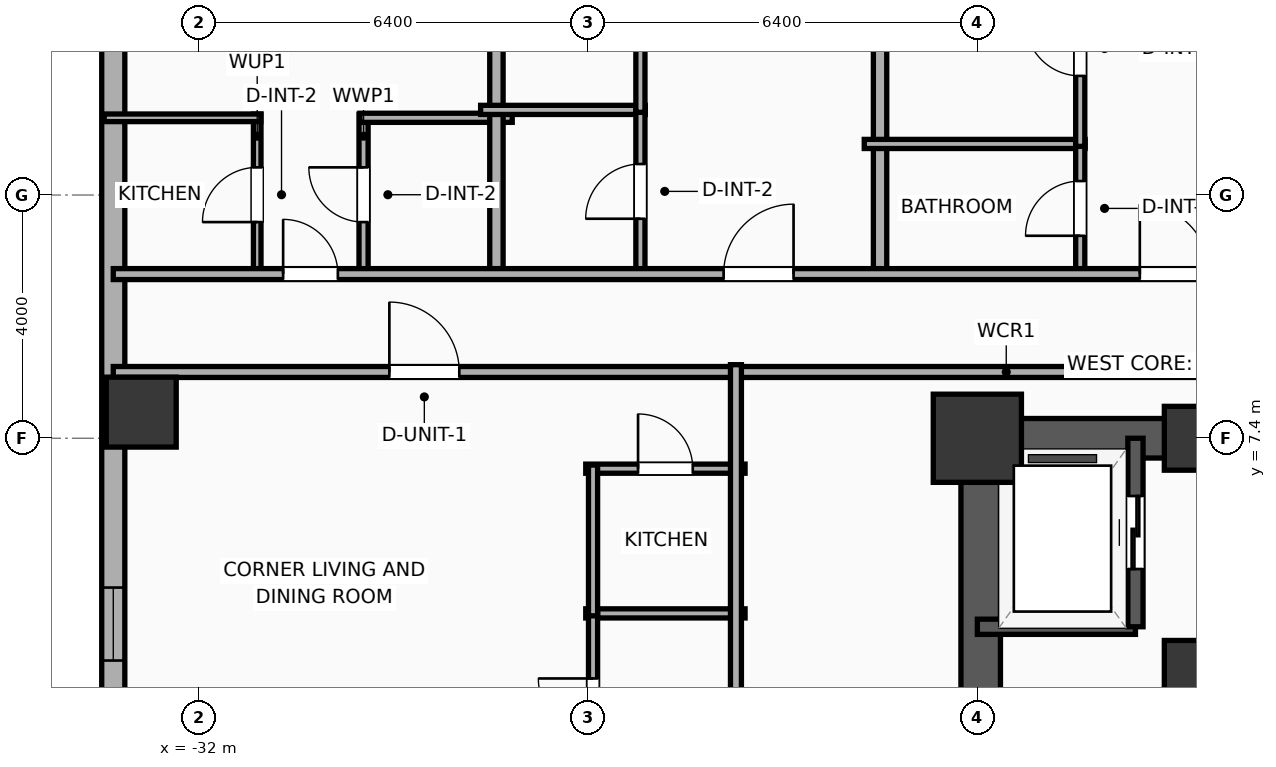
"""IFC4 building model, lengths in metres.
Left out: names, types, materials, properties, quantities, classifications, styles, units other than length and angle.
Written with IfcOpenShell. Run it as: python <this file> out.ifc"""

import sys

from ifc_helpers import new_model, si_unit, direction, frame, frame_2d, origin, origin_2d, place, context, subcontext, project, spatial, rectangle, hollow_rectangle, extrude, element, fill, save


model = new_model("IFC4")
c1 = context("Model", 3, precision=1e-05, world=origin(), true_north=direction((0.0, 1.0)))
c2 = subcontext(c1, "Body", "Model", "MODEL_VIEW")
j1 = project(units=[si_unit("LENGTHUNIT", "METRE"), si_unit("PLANEANGLEUNIT", "RADIAN")], contexts=[c1])
p1 = place(None, origin())
s1 = spatial("IfcSite", under=j1, at=p1, CompositionType="ELEMENT")
p2 = place(p1, origin())
s2 = spatial("IfcBuilding", under=s1, at=p2, CompositionType="ELEMENT")
p3 = place(p2, frame((0.0, 0.0, 33.8)))
s3 = spatial("IfcBuildingStorey", under=s2, at=p3, CompositionType="ELEMENT", Elevation=33.8)
p4 = place(p3, frame((-19.2, 7.4, 0.0), z_axis=(0.0, 0.0, 1.0), x_axis=(1.0, 0.0, 0.0)))
e1 = element("IfcColumn", 1, at=p4, inside=s3, PredefinedType="COLUMN", context=c2, shape_type="SweptSolid", body=[
    extrude(rectangle(XDim=1.45, YDim=1.45, at=origin_2d()), origin(), (0.0, 0.0, 1.0), 3.9),
])
for number, where, z_axis, x_axis in (
    (2, (-15.6, 7.4, 0.0), (0.0, 0.0, 1.0), (1.0, 0.0, 0.0)),
    (3, (-15.6, 3.55, 0.0), (0.0, 0.0, 1.0), (1.0, 0.0, 0.0)),
):
    element("IfcColumn", number, at=place(p3, frame(where, z_axis=z_axis, x_axis=x_axis)), inside=s3, PredefinedType="COLUMN", context=c2, shape_type="SweptSolid", body=[
        extrude(rectangle(XDim=1.05, YDim=1.05, at=origin_2d()), origin(), (0.0, 0.0, 1.0), 3.9),
    ])
p5 = place(p3, frame((-19.525, 7.4, 0.0), z_axis=(0.0, 0.0, 1.0), x_axis=(1.0, 0.0, 0.0)))
e4 = element("IfcWall", 4, at=p5, inside=s3, PredefinedType="SHEAR", context=c2, shape_type="SweptSolid", body=[
    extrude(rectangle(XDim=7.45, YDim=0.65, at=frame_2d((3.725, 0.0))), origin(), (0.0, 0.0, 1.0), 3.65),
])
p6 = place(p3, frame((-19.145, -7.4, 0.0), z_axis=(0.0, 0.0, 1.0), x_axis=(0.0, 1.0, 0.0)))
e5 = element("IfcWall", 5, at=p6, inside=s3, PredefinedType="SHEAR", context=c2, shape_type="SweptSolid", body=[
    extrude(rectangle(XDim=14.8, YDim=0.65, at=frame_2d((7.4, 0.0))), origin(), (0.0, 0.0, 1.0), 3.65),
])
p7 = place(p3, frame((-32.95, 7.83, 0.0), z_axis=(0.0, 0.0, 1.0), x_axis=(1.0, 0.0, 0.0)))
e6 = element("IfcColumn", 6, at=p7, inside=s3, PredefinedType="COLUMN", context=c2, shape_type="SweptSolid", body=[
    extrude(hollow_rectangle(XDim=1.15, YDim=1.15, WallThickness=0.04, at=origin_2d()), origin(), (0.0, 0.0, 1.0), 3.9),
])
p8 = place(p3, frame((-33.41, -18.381, 0.0), z_axis=(0.0, 0.0, 1.0), x_axis=(0.0, 1.0, 0.0)))
e7 = element("IfcWall", 7, at=p8, inside=s3, PredefinedType="ELEMENTEDWALL", context=c2, shape_type="SweptSolid", body=[
    extrude(rectangle(XDim=36.763, YDim=0.38, at=frame_2d((18.381, 0.0))), origin(), (0.0, 0.0, 1.0), 3.65),
])
p9 = place(p8, frame((32.857, 0.0, 0.75)))
e8 = element("IfcOpeningElement", 8, at=p9, cuts=e7, PredefinedType="OPENING", context=c2, shape_type="SweptSolid", body=[
    extrude(rectangle(XDim=1.2, YDim=2.05, at=frame_2d((0.6, 1.025))), frame((0.0, 0.2, 0.0), z_axis=(0.0, -1.0, 0.0), x_axis=(1.0, 0.0, 0.0)), (0.0, 0.0, 1.0), 0.4),
])
p10 = place(p8, frame((22.126, 0.0, 0.75)))
e9 = element("IfcOpeningElement", 9, at=p10, cuts=e7, PredefinedType="OPENING", context=c2, shape_type="SweptSolid", body=[
    extrude(rectangle(XDim=1.2, YDim=2.05, at=frame_2d((0.6, 1.025))), frame((0.0, 0.2, 0.0), z_axis=(0.0, -1.0, 0.0), x_axis=(1.0, 0.0, 0.0)), (0.0, 0.0, 1.0), 0.4),
])
p11 = place(p8, frame((13.576, 0.0, 0.75)))
e10 = element("IfcOpeningElement", 10, at=p11, cuts=e7, PredefinedType="OPENING", context=c2, shape_type="SweptSolid", body=[
    extrude(rectangle(XDim=1.2, YDim=2.05, at=frame_2d((0.6, 1.025))), frame((0.0, 0.2, 0.0), z_axis=(0.0, -1.0, 0.0), x_axis=(1.0, 0.0, 0.0)), (0.0, 0.0, 1.0), 0.4),
])
p12 = place(p3, frame((-19.2, 4.3, 0.0), z_axis=(0.0, 0.0, 1.0), x_axis=(1.0, 0.0, 0.0)))
e11 = element("IfcWall", 11, at=p12, inside=s3, PredefinedType="SOLIDWALL", context=c2, shape_type="SweptSolid", body=[
    extrude(rectangle(XDim=2.6, YDim=0.25, at=frame_2d((1.3, 0.0))), origin(), (0.0, 0.0, 1.0), 3.65),
])
p13 = place(p3, frame((-16.6, 4.3, 0.0), z_axis=(0.0, 0.0, 1.0), x_axis=(0.0, 1.0, 0.0)))
e12 = element("IfcWall", 12, at=p13, inside=s3, PredefinedType="SOLIDWALL", context=c2, shape_type="SweptSolid", body=[
    extrude(rectangle(XDim=3.1, YDim=0.25, at=frame_2d((1.55, 0.0))), origin(), (0.0, 0.0, 1.0), 3.65),
])
p14 = place(p13, frame((0.95, 0.0, 0.0)))
e13 = element("IfcOpeningElement", 13, at=p14, cuts=e12, PredefinedType="OPENING", context=c2, shape_type="SweptSolid", body=[
    extrude(rectangle(XDim=1.2, YDim=2.05, at=frame_2d((0.6, 1.025))), frame((0.0, 0.135, 0.0), z_axis=(0.0, -1.0, 0.0), x_axis=(1.0, 0.0, 0.0)), (0.0, 0.0, 1.0), 0.27),
])
p15 = place(p3, frame((-33.41, 8.49, 0.0), z_axis=(0.0, 0.0, 1.0), x_axis=(1.0, 0.0, 0.0)))
e14 = element("IfcWall", 14, at=p15, inside=s3, PredefinedType="PARTITIONING", context=c2, shape_type="SweptSolid", body=[
    extrude(rectangle(XDim=23.53, YDim=0.18, at=frame_2d((11.765, 0.0))), origin(), (0.0, 0.0, 1.0), 3.65),
])
p16 = place(p15, frame((4.54, 0.0, 0.0)))
e15 = element("IfcOpeningElement", 15, at=p16, cuts=e14, PredefinedType="OPENING", context=c2, shape_type="SweptSolid", body=[
    extrude(rectangle(XDim=1.15, YDim=2.05, at=frame_2d((0.575, 1.025))), frame((0.0, 0.1, 0.0), z_axis=(0.0, -1.0, 0.0), x_axis=(1.0, 0.0, 0.0)), (0.0, 0.0, 1.0), 0.2),
])
p17 = place(p3, frame((-31.043, 10.08, 0.0), z_axis=(0.0, 0.0, 1.0), x_axis=(0.0, 1.0, 0.0)))
e16 = element("IfcWall", 16, at=p17, inside=s3, PredefinedType="PARTITIONING", context=c2, shape_type="SweptSolid", body=[
    extrude(rectangle(XDim=2.65, YDim=0.125, at=frame_2d((1.325, 0.0))), origin(), (0.0, 0.0, 1.0), 3.65),
])
p18 = place(p17, frame((0.875, 0.0, 0.0)))
e17 = element("IfcOpeningElement", 17, at=p18, cuts=e16, PredefinedType="OPENING", context=c2, shape_type="SweptSolid", body=[
    extrude(rectangle(XDim=0.9, YDim=2.05, at=frame_2d((0.45, 1.025))), frame((0.0, 0.073, 0.0), z_axis=(0.0, -1.0, 0.0), x_axis=(1.0, 0.0, 0.0)), (0.0, 0.0, 1.0), 0.145),
])
p19 = place(p3, frame((-29.294, 10.08, 0.0), z_axis=(0.0, 0.0, 1.0), x_axis=(0.0, 1.0, 0.0)))
e18 = element("IfcWall", 18, at=p19, inside=s3, PredefinedType="PLUMBINGWALL", context=c2, shape_type="SweptSolid", body=[
    extrude(rectangle(XDim=2.65, YDim=0.15, at=frame_2d((1.325, 0.0))), origin(), (0.0, 0.0, 1.0), 3.65),
])
p20 = place(p19, frame((0.875, 0.0, 0.0)))
e19 = element("IfcOpeningElement", 19, at=p20, cuts=e18, PredefinedType="OPENING", context=c2, shape_type="SweptSolid", body=[
    extrude(rectangle(XDim=0.9, YDim=2.05, at=frame_2d((0.45, 1.025))), frame((0.0, 0.085, 0.0), z_axis=(0.0, -1.0, 0.0), x_axis=(1.0, 0.0, 0.0)), (0.0, 0.0, 1.0), 0.17),
])
p21 = place(p3, frame((-33.56, 12.67, 0.0), z_axis=(0.0, 0.0, 1.0), x_axis=(1.0, 0.0, 0.0)))
e20 = element("IfcWall", 20, at=p21, inside=s3, PredefinedType="PARTITIONING", context=c2, shape_type="SweptSolid", body=[
    extrude(rectangle(XDim=2.577, YDim=0.125, at=frame_2d((1.289, 0.0))), origin(), (0.0, 0.0, 1.0), 3.65),
])
p22 = place(p3, frame((-29.354, 12.67, 0.0), z_axis=(0.0, 0.0, 1.0), x_axis=(1.0, 0.0, 0.0)))
e21 = element("IfcWall", 21, at=p22, inside=s3, PredefinedType="PLUMBINGWALL", context=c2, shape_type="SweptSolid", body=[
    extrude(rectangle(XDim=2.505, YDim=0.15, at=frame_2d((1.252, 0.0))), origin(), (0.0, 0.0, 1.0), 3.65),
])
p23 = place(p3, frame((-27.109, 10.02, 0.0), z_axis=(0.0, 0.0, 1.0), x_axis=(0.0, 1.0, 0.0)))
e22 = element("IfcWall", 22, at=p23, inside=s3, PredefinedType="PARTITIONING", context=c2, shape_type="SweptSolid", body=[
    extrude(rectangle(XDim=12.19, YDim=0.22, at=frame_2d((6.095, 0.0))), origin(), (0.0, 0.0, 1.0), 3.65),
])
p24 = place(p3, frame((-27.369, 12.8, 0.0), z_axis=(0.0, 0.0, 1.0), x_axis=(1.0, 0.0, 0.0)))
e23 = element("IfcWall", 23, at=p24, inside=s3, PredefinedType="PLUMBINGWALL", context=c2, shape_type="SweptSolid", body=[
    extrude(rectangle(XDim=2.708, YDim=0.15, at=frame_2d((1.354, 0.0))), origin(), (0.0, 0.0, 1.0), 3.65),
])
p25 = place(p3, frame((-24.741, 10.08, 0.0), z_axis=(0.0, 0.0, 1.0), x_axis=(0.0, 1.0, 0.0)))
e24 = element("IfcWall", 24, at=p25, inside=s3, PredefinedType="PLUMBINGWALL", context=c2, shape_type="SweptSolid", body=[
    extrude(rectangle(XDim=2.76, YDim=0.15, at=frame_2d((1.38, 0.0))), origin(), (0.0, 0.0, 1.0), 3.65),
])
p26 = place(p25, frame((0.93, 0.0, 0.0)))
e25 = element("IfcOpeningElement", 25, at=p26, cuts=e24, PredefinedType="OPENING", context=c2, shape_type="SweptSolid", body=[
    extrude(rectangle(XDim=0.9, YDim=2.05, at=frame_2d((0.45, 1.025))), frame((0.0, 0.085, 0.0), z_axis=(0.0, -1.0, 0.0), x_axis=(1.0, 0.0, 0.0)), (0.0, 0.0, 1.0), 0.17),
])
p27 = place(p3, frame((-24.741, 12.76, 0.0), z_axis=(0.0, 0.0, 1.0), x_axis=(0.0, 1.0, 0.0)))
e26 = element("IfcWall", 26, at=p27, inside=s3, PredefinedType="PLUMBINGWALL", context=c2, shape_type="SweptSolid", body=[
    extrude(rectangle(XDim=9.498, YDim=0.15, at=frame_2d((4.749, 0.0))), origin(), (0.0, 0.0, 1.0), 3.65),
])
p28 = place(p27, frame((4.299, 0.0, 0.0)))
e27 = element("IfcOpeningElement", 27, at=p28, cuts=e26, PredefinedType="OPENING", context=c2, shape_type="SweptSolid", body=[
    extrude(rectangle(XDim=0.9, YDim=2.05, at=frame_2d((0.45, 1.025))), frame((0.0, 0.085, 0.0), z_axis=(0.0, -1.0, 0.0), x_axis=(1.0, 0.0, 0.0)), (0.0, 0.0, 1.0), 0.17),
])
p29 = place(p3, frame((-20.8, 10.02, 0.0), z_axis=(0.0, 0.0, 1.0), x_axis=(0.0, 1.0, 0.0)))
e28 = element("IfcWall", 28, at=p29, inside=s3, PredefinedType="PARTITIONING", context=c2, shape_type="SweptSolid", body=[
    extrude(rectangle(XDim=12.19, YDim=0.22, at=frame_2d((6.095, 0.0))), origin(), (0.0, 0.0, 1.0), 3.65),
])
p30 = place(p3, frame((-21.06, 12.24, 0.0), z_axis=(0.0, 0.0, 1.0), x_axis=(1.0, 0.0, 0.0)))
e29 = element("IfcWall", 29, at=p30, inside=s3, PredefinedType="PLUMBINGWALL", context=c2, shape_type="SweptSolid", body=[
    extrude(rectangle(XDim=3.632, YDim=0.15, at=frame_2d((1.816, 0.0))), origin(), (0.0, 0.0, 1.0), 3.65),
])
p31 = place(p3, frame((-17.508, 10.08, 0.0), z_axis=(0.0, 0.0, 1.0), x_axis=(0.0, 1.0, 0.0)))
e30 = element("IfcWall", 30, at=p31, inside=s3, PredefinedType="PLUMBINGWALL", context=c2, shape_type="SweptSolid", body=[
    extrude(rectangle(XDim=2.2, YDim=0.15, at=frame_2d((1.1, 0.0))), origin(), (0.0, 0.0, 1.0), 3.65),
])
p32 = place(p31, frame((0.65, 0.0, 0.0)))
e31 = element("IfcOpeningElement", 31, at=p32, cuts=e30, PredefinedType="OPENING", context=c2, shape_type="SweptSolid", body=[
    extrude(rectangle(XDim=0.9, YDim=2.05, at=frame_2d((0.45, 1.025))), frame((0.0, 0.085, 0.0), z_axis=(0.0, -1.0, 0.0), x_axis=(1.0, 0.0, 0.0)), (0.0, 0.0, 1.0), 0.17),
])
p33 = place(p3, frame((-17.508, 12.2, 0.0), z_axis=(0.0, 0.0, 1.0), x_axis=(0.0, 1.0, 0.0)))
e32 = element("IfcWall", 32, at=p33, inside=s3, PredefinedType="PLUMBINGWALL", context=c2, shape_type="SweptSolid", body=[
    extrude(rectangle(XDim=10.058, YDim=0.15, at=frame_2d((5.029, 0.0))), origin(), (0.0, 0.0, 1.0), 3.65),
])
p34 = place(p33, frame((1.159, 0.0, 0.0)))
e33 = element("IfcOpeningElement", 33, at=p34, cuts=e32, PredefinedType="OPENING", context=c2, shape_type="SweptSolid", body=[
    extrude(rectangle(XDim=0.9, YDim=2.05, at=frame_2d((0.45, 1.025))), frame((0.0, 0.085, 0.0), z_axis=(0.0, -1.0, 0.0), x_axis=(1.0, 0.0, 0.0)), (0.0, 0.0, 1.0), 0.17),
])
p35 = place(p3, frame((-33.41, 10.1, 0.0), z_axis=(0.0, 0.0, 1.0), x_axis=(1.0, 0.0, 0.0)))
e34 = element("IfcWall", 34, at=p35, inside=s3, PredefinedType="PARTITIONING", context=c2, shape_type="SweptSolid", body=[
    extrude(rectangle(XDim=59.62, YDim=0.18, at=frame_2d((29.81, 0.0))), origin(), (0.0, 0.0, 1.0), 3.65),
])
p36 = place(p35, frame((2.793, 0.0, 0.0)))
e35 = element("IfcOpeningElement", 35, at=p36, cuts=e34, PredefinedType="OPENING", context=c2, shape_type="SweptSolid", body=[
    extrude(rectangle(XDim=0.9, YDim=2.05, at=frame_2d((0.45, 1.025))), frame((0.0, 0.1, 0.0), z_axis=(0.0, -1.0, 0.0), x_axis=(1.0, 0.0, 0.0)), (0.0, 0.0, 1.0), 0.2),
])
p37 = place(p35, frame((10.037, 0.0, 0.0)))
e36 = element("IfcOpeningElement", 36, at=p37, cuts=e34, PredefinedType="OPENING", context=c2, shape_type="SweptSolid", body=[
    extrude(rectangle(XDim=1.15, YDim=2.05, at=frame_2d((0.575, 1.025))), frame((0.0, 0.1, 0.0), z_axis=(0.0, -1.0, 0.0), x_axis=(1.0, 0.0, 0.0)), (0.0, 0.0, 1.0), 0.2),
])
p38 = place(p35, frame((16.882, 0.0, 0.0)))
e37 = element("IfcOpeningElement", 37, at=p38, cuts=e34, PredefinedType="OPENING", context=c2, shape_type="SweptSolid", body=[
    extrude(rectangle(XDim=1.15, YDim=2.05, at=frame_2d((0.575, 1.025))), frame((0.0, 0.1, 0.0), z_axis=(0.0, -1.0, 0.0), x_axis=(1.0, 0.0, 0.0)), (0.0, 0.0, 1.0), 0.2),
])
p39 = place(p35, frame((25.801, 0.0, 0.0)))
e38 = element("IfcOpeningElement", 38, at=p39, cuts=e34, PredefinedType="OPENING", context=c2, shape_type="SweptSolid", body=[
    extrude(rectangle(XDim=1.15, YDim=2.05, at=frame_2d((0.575, 1.025))), frame((0.0, 0.1, 0.0), z_axis=(0.0, -1.0, 0.0), x_axis=(1.0, 0.0, 0.0)), (0.0, 0.0, 1.0), 0.2),
])
p40 = place(p35, frame((34.72, 0.0, 0.0)))
e39 = element("IfcOpeningElement", 39, at=p40, cuts=e34, PredefinedType="OPENING", context=c2, shape_type="SweptSolid", body=[
    extrude(rectangle(XDim=1.15, YDim=2.05, at=frame_2d((0.575, 1.025))), frame((0.0, 0.1, 0.0), z_axis=(0.0, -1.0, 0.0), x_axis=(1.0, 0.0, 0.0)), (0.0, 0.0, 1.0), 0.2),
])
p41 = place(p35, frame((43.771, 0.0, 0.0)))
e40 = element("IfcOpeningElement", 40, at=p41, cuts=e34, PredefinedType="OPENING", context=c2, shape_type="SweptSolid", body=[
    extrude(rectangle(XDim=1.15, YDim=2.05, at=frame_2d((0.575, 1.025))), frame((0.0, 0.1, 0.0), z_axis=(0.0, -1.0, 0.0), x_axis=(1.0, 0.0, 0.0)), (0.0, 0.0, 1.0), 0.2),
])
p42 = place(p35, frame((49.715, 0.0, 0.0)))
e41 = element("IfcOpeningElement", 41, at=p42, cuts=e34, PredefinedType="OPENING", context=c2, shape_type="SweptSolid", body=[
    extrude(rectangle(XDim=1.15, YDim=2.05, at=frame_2d((0.575, 1.025))), frame((0.0, 0.1, 0.0), z_axis=(0.0, -1.0, 0.0), x_axis=(1.0, 0.0, 0.0)), (0.0, 0.0, 1.0), 0.2),
])
p43 = place(p35, frame((56.654, 0.0, 0.0)))
e42 = element("IfcOpeningElement", 42, at=p43, cuts=e34, PredefinedType="OPENING", context=c2, shape_type="SweptSolid", body=[
    extrude(rectangle(XDim=0.9, YDim=2.05, at=frame_2d((0.45, 1.025))), frame((0.0, 0.1, 0.0), z_axis=(0.0, -1.0, 0.0), x_axis=(1.0, 0.0, 0.0)), (0.0, 0.0, 1.0), 0.2),
])
p44 = place(p3, frame((-25.64, 6.9, 0.0), z_axis=(0.0, 0.0, 1.0), x_axis=(1.0, 0.0, 0.0)))
e43 = element("IfcWall", 43, at=p44, inside=s3, PredefinedType="PLUMBINGWALL", context=c2, shape_type="SweptSolid", body=[
    extrude(rectangle(XDim=2.62, YDim=0.15, at=frame_2d((1.31, 0.0))), origin(), (0.0, 0.0, 1.0), 3.65),
])
p45 = place(p44, frame((0.86, 0.0, 0.0)))
e44 = element("IfcOpeningElement", 44, at=p45, cuts=e43, PredefinedType="OPENING", context=c2, shape_type="SweptSolid", body=[
    extrude(rectangle(XDim=0.9, YDim=2.05, at=frame_2d((0.45, 1.025))), frame((0.0, 0.085, 0.0), z_axis=(0.0, -1.0, 0.0), x_axis=(1.0, 0.0, 0.0)), (0.0, 0.0, 1.0), 0.17),
])
p46 = place(p3, frame((-25.64, 4.52, 0.0), z_axis=(0.0, 0.0, 1.0), x_axis=(1.0, 0.0, 0.0)))
e45 = element("IfcWall", 45, at=p46, inside=s3, PredefinedType="PLUMBINGWALL", context=c2, shape_type="SweptSolid", body=[
    extrude(rectangle(XDim=2.62, YDim=0.15, at=frame_2d((1.31, 0.0))), origin(), (0.0, 0.0, 1.0), 3.65),
])
p47 = place(p3, frame((-25.52, 1.44, 0.0), z_axis=(0.0, 0.0, 1.0), x_axis=(0.0, 1.0, 0.0)))
e46 = element("IfcWall", 46, at=p47, inside=s3, PredefinedType="PLUMBINGWALL", context=c2, shape_type="SweptSolid", body=[
    extrude(rectangle(XDim=3.12, YDim=0.15, at=frame_2d((1.56, 0.0))), origin(), (0.0, 0.0, 1.0), 3.65),
])
p48 = place(p47, frame((1.11, 0.0, 0.0)))
e47 = element("IfcOpeningElement", 47, at=p48, cuts=e46, PredefinedType="OPENING", context=c2, shape_type="SweptSolid", body=[
    extrude(rectangle(XDim=0.9, YDim=2.05, at=frame_2d((0.45, 1.025))), frame((0.0, 0.085, 0.0), z_axis=(0.0, -1.0, 0.0), x_axis=(1.0, 0.0, 0.0)), (0.0, 0.0, 1.0), 0.17),
])
p49 = place(p3, frame((-25.52, 4.48, 0.0), z_axis=(0.0, 0.0, 1.0), x_axis=(0.0, 1.0, 0.0)))
e48 = element("IfcWall", 48, at=p49, inside=s3, PredefinedType="PLUMBINGWALL", context=c2, shape_type="SweptSolid", body=[
    extrude(rectangle(XDim=2.48, YDim=0.15, at=frame_2d((1.24, 0.0))), origin(), (0.0, 0.0, 1.0), 3.65),
])
p50 = place(p3, frame((-23.17, -8.61, 0.0), z_axis=(0.0, 0.0, 1.0), x_axis=(0.0, 1.0, 0.0)))
e49 = element("IfcWall", 49, at=p50, inside=s3, PredefinedType="PARTITIONING", context=c2, shape_type="SweptSolid", body=[
    extrude(rectangle(XDim=17.22, YDim=0.18, at=frame_2d((8.61, 0.0))), origin(), (0.0, 0.0, 1.0), 3.65),
])
p51 = place(p10, origin())
e50 = element("IfcWindow", 50, at=p51, inside=s3, PartitioningType="SINGLE_PANEL", PredefinedType="WINDOW", context=c2, shape_type="SweptSolid", body=[
    extrude(rectangle(XDim=1.2, YDim=2.05, at=frame_2d((0.6, 1.025))), frame((0.0, 0.03, 0.0), z_axis=(0.0, -1.0, 0.0), x_axis=(1.0, 0.0, 0.0)), (0.0, 0.0, 1.0), 0.06),
])
fill(e9, e50)
p52 = place(p14, origin())
e51 = element("IfcDoor", 51, at=p52, inside=s3, OperationType="SLIDING_TO_LEFT", PredefinedType="DOOR", context=c2, shape_type="SweptSolid", body=[
    extrude(rectangle(XDim=1.2, YDim=2.05, at=frame_2d((0.6, 1.025))), frame((0.0, 0.025, 0.0), z_axis=(0.0, -1.0, 0.0), x_axis=(1.0, 0.0, 0.0)), (0.0, 0.0, 1.0), 0.05),
])
fill(e13, e51)
p53 = place(p16, origin())
e52 = element("IfcDoor", 52, at=p53, inside=s3, OperationType="SINGLE_SWING_LEFT", PredefinedType="DOOR", context=c2, shape_type="SweptSolid", body=[
    extrude(rectangle(XDim=1.15, YDim=2.05, at=frame_2d((0.575, 1.025))), frame((0.0, 0.025, 0.0), z_axis=(0.0, -1.0, 0.0), x_axis=(1.0, 0.0, 0.0)), (0.0, 0.0, 1.0), 0.05),
])
fill(e15, e52)
p54 = place(p18, origin())
e53 = element("IfcDoor", 53, at=p54, inside=s3, OperationType="SINGLE_SWING_LEFT", PredefinedType="DOOR", context=c2, shape_type="SweptSolid", body=[
    extrude(rectangle(XDim=0.9, YDim=2.05, at=frame_2d((0.45, 1.025))), frame((0.0, 0.025, 0.0), z_axis=(0.0, -1.0, 0.0), x_axis=(1.0, 0.0, 0.0)), (0.0, 0.0, 1.0), 0.05),
])
fill(e17, e53)
p55 = place(p20, origin())
e54 = element("IfcDoor", 54, at=p55, inside=s3, OperationType="SINGLE_SWING_RIGHT", PredefinedType="DOOR", context=c2, shape_type="SweptSolid", body=[
    extrude(rectangle(XDim=0.9, YDim=2.05, at=frame_2d((0.45, 1.025))), frame((0.0, 0.025, 0.0), z_axis=(0.0, -1.0, 0.0), x_axis=(1.0, 0.0, 0.0)), (0.0, 0.0, 1.0), 0.05),
])
fill(e19, e54)
p56 = place(p26, origin())
e55 = element("IfcDoor", 55, at=p56, inside=s3, OperationType="SINGLE_SWING_LEFT", PredefinedType="DOOR", context=c2, shape_type="SweptSolid", body=[
    extrude(rectangle(XDim=0.9, YDim=2.05, at=frame_2d((0.45, 1.025))), frame((0.0, 0.025, 0.0), z_axis=(0.0, -1.0, 0.0), x_axis=(1.0, 0.0, 0.0)), (0.0, 0.0, 1.0), 0.05),
])
fill(e25, e55)
p57 = place(p32, origin())
e56 = element("IfcDoor", 56, at=p57, inside=s3, OperationType="SINGLE_SWING_LEFT", PredefinedType="DOOR", context=c2, shape_type="SweptSolid", body=[
    extrude(rectangle(XDim=0.9, YDim=2.05, at=frame_2d((0.45, 1.025))), frame((0.0, 0.025, 0.0), z_axis=(0.0, -1.0, 0.0), x_axis=(1.0, 0.0, 0.0)), (0.0, 0.0, 1.0), 0.05),
])
fill(e31, e56)
p58 = place(p34, origin())
e57 = element("IfcDoor", 57, at=p58, inside=s3, OperationType="SINGLE_SWING_RIGHT", PredefinedType="DOOR", context=c2, shape_type="SweptSolid", body=[
    extrude(rectangle(XDim=0.9, YDim=2.05, at=frame_2d((0.45, 1.025))), frame((0.0, 0.025, 0.0), z_axis=(0.0, -1.0, 0.0), x_axis=(1.0, 0.0, 0.0)), (0.0, 0.0, 1.0), 0.05),
])
fill(e33, e57)
p59 = place(p36, origin())
e58 = element("IfcDoor", 58, at=p59, inside=s3, OperationType="SINGLE_SWING_LEFT", PredefinedType="DOOR", context=c2, shape_type="SweptSolid", body=[
    extrude(rectangle(XDim=0.9, YDim=2.05, at=frame_2d((0.45, 1.025))), frame((0.0, 0.025, 0.0), z_axis=(0.0, -1.0, 0.0), x_axis=(1.0, 0.0, 0.0)), (0.0, 0.0, 1.0), 0.05),
])
fill(e35, e58)
p60 = place(p37, origin())
e59 = element("IfcDoor", 59, at=p60, inside=s3, OperationType="SINGLE_SWING_RIGHT", PredefinedType="DOOR", context=c2, shape_type="SweptSolid", body=[
    extrude(rectangle(XDim=1.15, YDim=2.05, at=frame_2d((0.575, 1.025))), frame((0.0, 0.025, 0.0), z_axis=(0.0, -1.0, 0.0), x_axis=(1.0, 0.0, 0.0)), (0.0, 0.0, 1.0), 0.05),
])
fill(e36, e59)
p61 = place(p38, origin())
e60 = element("IfcDoor", 60, at=p61, inside=s3, OperationType="SINGLE_SWING_LEFT", PredefinedType="DOOR", context=c2, shape_type="SweptSolid", body=[
    extrude(rectangle(XDim=1.15, YDim=2.05, at=frame_2d((0.575, 1.025))), frame((0.0, 0.025, 0.0), z_axis=(0.0, -1.0, 0.0), x_axis=(1.0, 0.0, 0.0)), (0.0, 0.0, 1.0), 0.05),
])
fill(e37, e60)
p62 = place(p45, origin())
e61 = element("IfcDoor", 61, at=p62, inside=s3, OperationType="SINGLE_SWING_LEFT", PredefinedType="DOOR", context=c2, shape_type="SweptSolid", body=[
    extrude(rectangle(XDim=0.9, YDim=2.05, at=frame_2d((0.45, 1.025))), frame((0.0, 0.025, 0.0), z_axis=(0.0, -1.0, 0.0), x_axis=(1.0, 0.0, 0.0)), (0.0, 0.0, 1.0), 0.05),
])
fill(e44, e61)
p63 = place(p48, origin())
e62 = element("IfcDoor", 62, at=p63, inside=s3, OperationType="SINGLE_SWING_RIGHT", PredefinedType="DOOR", context=c2, shape_type="SweptSolid", body=[
    extrude(rectangle(XDim=0.9, YDim=2.05, at=frame_2d((0.45, 1.025))), frame((0.0, 0.025, 0.0), z_axis=(0.0, -1.0, 0.0), x_axis=(1.0, 0.0, 0.0)), (0.0, 0.0, 1.0), 0.05),
])
fill(e47, e62)
save(model, sys.argv[1])
